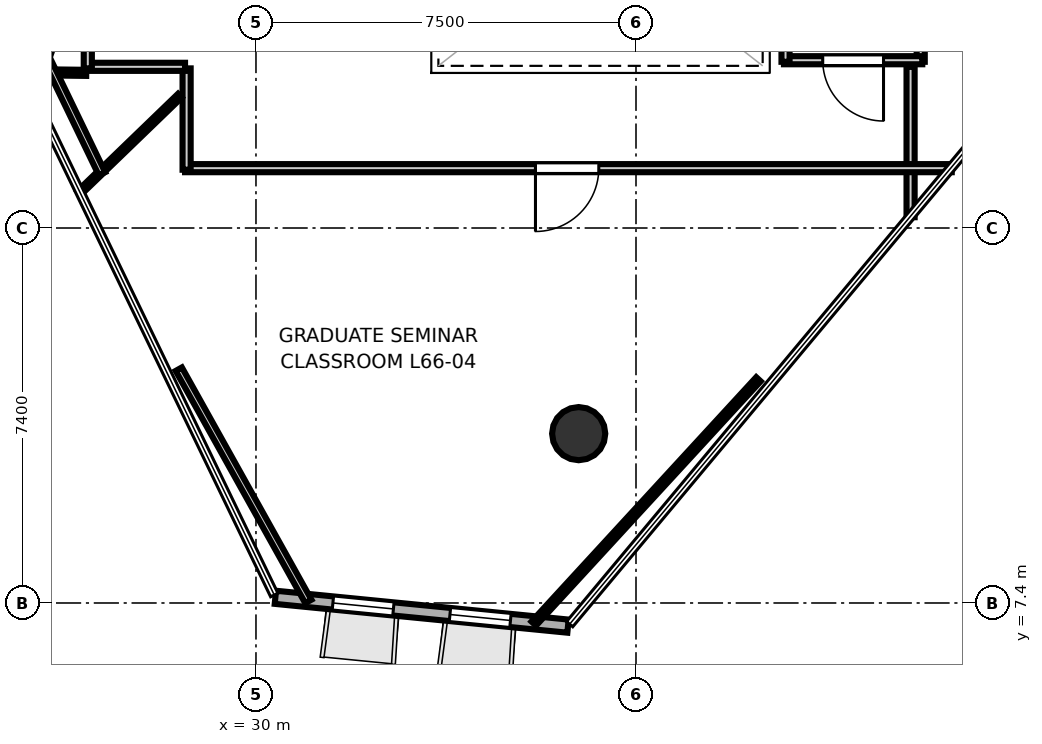
"""IFC4 building model, lengths in metres.
Left out: names, types, materials, properties, quantities, classifications, styles, units other than length and angle.
Written with IfcOpenShell. Run it as: python <this file> out.ifc"""

import sys

from ifc_helpers import new_model, si_unit, direction, frame, frame_2d, origin, origin_2d, place, context, subcontext, project, spatial, rectangle, hollow_circle, extrude, element, fill, save


model = new_model("IFC4")
c1 = context("Model", 3, precision=1e-05, world=origin(), true_north=direction((0.0, 1.0)))
c2 = subcontext(c1, "Body", "Model", "MODEL_VIEW")
j1 = project(units=[si_unit("LENGTHUNIT", "METRE"), si_unit("PLANEANGLEUNIT", "RADIAN")], contexts=[c1])
p1 = place(None, origin())
s1 = spatial("IfcSite", under=j1, at=p1, CompositionType="ELEMENT")
p2 = place(p1, origin())
s2 = spatial("IfcBuilding", under=s1, at=p2, CompositionType="ELEMENT")
p3 = place(p2, frame((0.0, 0.0, 257.5)))
s3 = spatial("IfcBuildingStorey", under=s2, at=p3, CompositionType="ELEMENT", Elevation=257.5)
p4 = place(p3, frame((36.369, 10.742, 0.0), z_axis=(0.0, 0.0, 1.0), x_axis=(1.0, 0.0, 0.0)))
e1 = element("IfcColumn", 1, at=p4, inside=s3, PredefinedType="COLUMN", context=c2, shape_type="SweptSolid", body=[
    extrude(hollow_circle(Radius=0.525, WallThickness=0.028, at=origin_2d()), origin(), (0.0, 0.0, 1.0), 3.7),
])
p5 = place(p3, frame((30.383, 7.512, 0.0), z_axis=(0.0, 0.0, 1.0), x_axis=(0.99517985896, -0.098066550464, 0.0)))
e2 = element("IfcWall", 2, at=p5, inside=s3, PredefinedType="SOLIDWALL", context=c2, shape_type="SweptSolid", body=[
    extrude(rectangle(XDim=5.803, YDim=0.26, at=frame_2d((2.902, 0.0))), origin(), (0.0, 0.0, 1.0), 3.52),
])
p6 = place(p5, frame((1.141, 0.0, 0.9)))
e3 = element("IfcOpeningElement", 3, at=p6, cuts=e2, PredefinedType="OPENING", context=c2, shape_type="SweptSolid", body=[
    extrude(rectangle(XDim=1.2, YDim=2.0, at=frame_2d((0.6, 1.0))), frame((0.0, 0.14, 0.0), z_axis=(0.0, -1.0, 0.0), x_axis=(1.0, 0.0, 0.0)), (0.0, 0.0, 1.0), 0.28),
])
p7 = place(p5, frame((3.462, 0.0, 0.9)))
e4 = element("IfcOpeningElement", 4, at=p7, cuts=e2, PredefinedType="OPENING", context=c2, shape_type="SweptSolid", body=[
    extrude(rectangle(XDim=1.2, YDim=2.0, at=frame_2d((0.6, 1.0))), frame((0.0, 0.14, 0.0), z_axis=(0.0, -1.0, 0.0), x_axis=(1.0, 0.0, 0.0)), (0.0, 0.0, 1.0), 0.28),
])
p8 = place(p3, frame((43.119, 22.05, 0.0), z_axis=(0.0, 0.0, 1.0), x_axis=(0.0, -1.0, 0.0)))
e5 = element("IfcWall", 5, at=p8, inside=s3, PredefinedType="PARTITIONING", context=c2, shape_type="SweptSolid", body=[
    extrude(rectangle(XDim=3.97, YDim=0.16, at=frame_2d((1.985, 0.0))), origin(), (0.0, 0.0, 1.0), 2.84),
])
p9 = place(p8, frame((0.94, 0.0, 0.0)))
e6 = element("IfcOpeningElement", 6, at=p9, cuts=e5, PredefinedType="OPENING", context=c2, shape_type="SweptSolid", body=[
    extrude(rectangle(XDim=1.25, YDim=2.2, at=frame_2d((0.625, 1.1))), frame((0.0, 0.09, 0.0), z_axis=(0.0, -1.0, 0.0), x_axis=(1.0, 0.0, 0.0)), (0.0, 0.0, 1.0), 0.18),
])
p10 = place(p3, frame((43.15, 18.111, 0.0), z_axis=(0.0, 0.0, 1.0), x_axis=(-1.0, 0.0, 0.0)))
e7 = element("IfcWall", 7, at=p10, inside=s3, PredefinedType="PARTITIONING", context=c2, shape_type="SweptSolid", body=[
    extrude(rectangle(XDim=2.73, YDim=0.16, at=frame_2d((1.365, 0.0))), origin(), (0.0, 0.0, 1.0), 2.84),
])
p11 = place(p10, frame((0.765, 0.0, 0.0)))
e8 = element("IfcOpeningElement", 8, at=p11, cuts=e7, PredefinedType="OPENING", context=c2, shape_type="SweptSolid", body=[
    extrude(rectangle(XDim=1.2, YDim=2.15, at=frame_2d((0.6, 1.075))), frame((0.0, 0.09, 0.0), z_axis=(0.0, -1.0, 0.0), x_axis=(1.0, 0.0, 0.0)), (0.0, 0.0, 1.0), 0.18),
])
p12 = place(p3, frame((40.451, 18.08, 0.0), z_axis=(0.0, 0.0, 1.0), x_axis=(0.0, 1.0, 0.0)))
e9 = element("IfcWall", 9, at=p12, inside=s3, PredefinedType="PARTITIONING", context=c2, shape_type="SweptSolid", body=[
    extrude(rectangle(XDim=3.32, YDim=0.16, at=frame_2d((1.66, 0.0))), origin(), (0.0, 0.0, 1.0), 2.84),
])
p13 = place(p3, frame((42.919, 17.98, 0.0), z_axis=(0.0, 0.0, 1.0), x_axis=(0.0, -1.0, 0.0)))
e10 = element("IfcWall", 10, at=p13, inside=s3, PredefinedType="PARTITIONING", context=c2, shape_type="SweptSolid", body=[
    extrude(rectangle(XDim=2.967, YDim=0.16, at=frame_2d((1.483, 0.0))), origin(), (0.0, 0.0, 1.0), 2.84),
])
p14 = place(p3, frame((43.731, 15.981, 0.0), z_axis=(0.0, 0.0, 1.0), x_axis=(-1.0, 0.0, 0.0)))
e11 = element("IfcWall", 11, at=p14, inside=s3, PredefinedType="PARTITIONING", context=c2, shape_type="SweptSolid", body=[
    extrude(rectangle(XDim=15.131, YDim=0.16, at=frame_2d((7.565, 0.0))), origin(), (0.0, 0.0, 1.0), 2.84),
])
p15 = place(p14, frame((6.965, 0.0, 0.0)))
e12 = element("IfcOpeningElement", 12, at=p15, cuts=e11, PredefinedType="OPENING", context=c2, shape_type="SweptSolid", body=[
    extrude(rectangle(XDim=1.25, YDim=2.2, at=frame_2d((0.625, 1.1))), frame((0.0, 0.09, 0.0), z_axis=(0.0, -1.0, 0.0), x_axis=(1.0, 0.0, 0.0)), (0.0, 0.0, 1.0), 0.18),
])
p16 = place(p3, frame((28.631, 15.95, 0.0), z_axis=(0.0, 0.0, 1.0), x_axis=(0.0, 1.0, 0.0)))
e13 = element("IfcWall", 13, at=p16, inside=s3, PredefinedType="PARTITIONING", context=c2, shape_type="SweptSolid", body=[
    extrude(rectangle(XDim=2.0, YDim=0.16, at=frame_2d((1.0, 0.0))), origin(), (0.0, 0.0, 1.0), 2.84),
])
p17 = place(p3, frame((28.6, 17.981, 0.0), z_axis=(0.0, 0.0, 1.0), x_axis=(-1.0, 0.0, 0.0)))
e14 = element("IfcWall", 14, at=p17, inside=s3, PredefinedType="PARTITIONING", context=c2, shape_type="SweptSolid", body=[
    extrude(rectangle(XDim=1.95, YDim=0.16, at=frame_2d((0.975, 0.0))), origin(), (0.0, 0.0, 1.0), 2.84),
])
p18 = place(p3, frame((26.681, 17.95, 0.0), z_axis=(0.0, 0.0, 1.0), x_axis=(0.0, 1.0, 0.0)))
e15 = element("IfcWall", 15, at=p18, inside=s3, PredefinedType="PARTITIONING", context=c2, shape_type="SweptSolid", body=[
    extrude(rectangle(XDim=3.2, YDim=0.16, at=frame_2d((1.6, 0.0))), origin(), (0.0, 0.0, 1.0), 2.84),
])
p19 = place(p3, frame((26.539, 20.109, 0.0), z_axis=(0.0, 0.0, 1.0), x_axis=(-0.331161515891, -0.94357408315, 0.0)))
e16 = element("IfcWall", 16, at=p19, inside=s3, PredefinedType="PARTITIONING", context=c2, shape_type="SweptSolid", body=[
    extrude(rectangle(XDim=2.842, YDim=0.14, at=frame_2d((1.421, 0.0))), origin(), (0.0, 0.0, 1.0), 2.84),
])
p20 = place(p3, frame((25.361, 17.877, 0.0), z_axis=(0.0, 0.0, 1.0), x_axis=(0.999926518374, -0.012122617385, 0.0)))
e17 = element("IfcWall", 17, at=p20, inside=s3, PredefinedType="PARTITIONING", context=c2, shape_type="SweptSolid", body=[
    extrude(rectangle(XDim=1.289, YDim=0.12, at=frame_2d((0.645, 0.0))), origin(), (0.0, 0.0, 1.0), 2.84),
])
p21 = place(p3, frame((28.499, 17.412, 0.0), z_axis=(0.0, 0.0, 1.0), x_axis=(-0.719456270986, -0.694537741335, 0.0)))
e18 = element("IfcWall", 18, at=p21, inside=s3, PredefinedType="PARTITIONING", context=c2, shape_type="SweptSolid", body=[
    extrude(rectangle(XDim=2.763, YDim=0.105, at=frame_2d((1.381, 0.0))), origin(), (0.0, 0.0, 1.0), 2.84),
])
p22 = place(p3, frame((26.961, 15.871, 0.0), z_axis=(0.0, 0.0, 1.0), x_axis=(-0.434614939442, 0.90061637472, 0.0)))
e19 = element("IfcWall", 19, at=p22, inside=s3, PredefinedType="PARTITIONING", context=c2, shape_type="SweptSolid", body=[
    extrude(rectangle(XDim=12.064, YDim=0.14, at=frame_2d((6.032, 0.0))), origin(), (0.0, 0.0, 1.0), 2.84),
])
p23 = place(p3, frame((39.917, 11.815, 0.0), z_axis=(0.0, 0.0, 1.0), x_axis=(-0.676977413292, -0.736003792037, 0.0)))
e20 = element("IfcWall", 20, at=p23, inside=s3, PredefinedType="PARTITIONING", context=c2, shape_type="SweptSolid", body=[
    extrude(rectangle(XDim=6.552, YDim=0.12, at=frame_2d((3.276, 0.0))), origin(), (0.0, 0.0, 1.0), 2.84),
])
p24 = place(p3, frame((31.034, 7.431, 0.0), z_axis=(0.0, 0.0, 1.0), x_axis=(-0.487170661312, 0.873306788453, 0.0)))
e21 = element("IfcWall", 21, at=p24, inside=s3, PredefinedType="PARTITIONING", context=c2, shape_type="SweptSolid", body=[
    extrude(rectangle(XDim=5.249, YDim=0.14, at=frame_2d((2.624, 0.0))), origin(), (0.0, 0.0, 1.0), 2.84),
])
p25 = place(p11, origin())
e22 = element("IfcDoor", 22, at=p25, inside=s3, OperationType="SINGLE_SWING_LEFT", PredefinedType="DOOR", context=c2, shape_type="SweptSolid", body=[
    extrude(rectangle(XDim=1.2, YDim=2.15, at=frame_2d((0.6, 1.075))), frame((0.0, 0.025, 0.0), z_axis=(0.0, -1.0, 0.0), x_axis=(1.0, 0.0, 0.0)), (0.0, 0.0, 1.0), 0.05),
])
fill(e8, e22)
p26 = place(p15, origin())
e23 = element("IfcDoor", 23, at=p26, inside=s3, OperationType="SINGLE_SWING_RIGHT", PredefinedType="DOOR", context=c2, shape_type="SweptSolid", body=[
    extrude(rectangle(XDim=1.25, YDim=2.2, at=frame_2d((0.625, 1.1))), frame((0.0, 0.025, 0.0), z_axis=(0.0, -1.0, 0.0), x_axis=(1.0, 0.0, 0.0)), (0.0, 0.0, 1.0), 0.05),
])
fill(e12, e23)
p27 = place(p6, origin())
e24 = element("IfcWindow", 24, at=p27, inside=s3, PartitioningType="SINGLE_PANEL", PredefinedType="WINDOW", context=c2, shape_type="SweptSolid", body=[
    extrude(rectangle(XDim=1.2, YDim=2.0, at=frame_2d((0.6, 1.0))), frame((0.0, 0.03, 0.0), z_axis=(0.0, -1.0, 0.0), x_axis=(1.0, 0.0, 0.0)), (0.0, 0.0, 1.0), 0.06),
])
fill(e3, e24)
p28 = place(p7, origin())
e25 = element("IfcWindow", 25, at=p28, inside=s3, PartitioningType="SINGLE_PANEL", PredefinedType="WINDOW", context=c2, shape_type="SweptSolid", body=[
    extrude(rectangle(XDim=1.2, YDim=2.0, at=frame_2d((0.6, 1.0))), frame((0.0, 0.03, 0.0), z_axis=(0.0, -1.0, 0.0), x_axis=(1.0, 0.0, 0.0)), (0.0, 0.0, 1.0), 0.06),
])
fill(e4, e25)
save(model, sys.argv[1])
